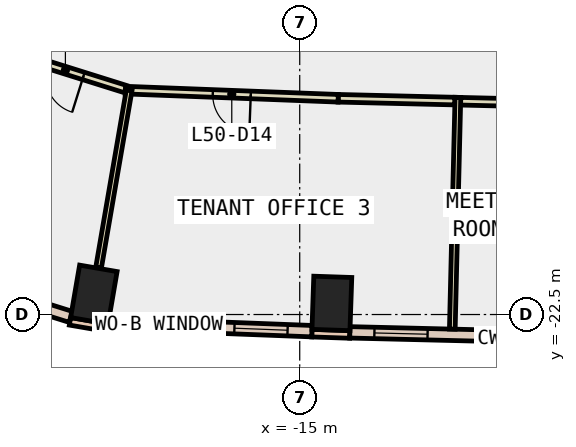
"""IFC4 building model, lengths in metres.
Left out: names, types, materials, properties, quantities, classifications, styles, units other than length and angle.
Written with IfcOpenShell. Run it as: python <this file> out.ifc"""

import sys

from ifc_helpers import new_model, si_unit, direction, frame, frame_2d, origin, origin_2d, place, context, subcontext, project, spatial, rectangle, extrude, element, fill, save


model = new_model("IFC4")
c1 = context("Model", 3, precision=1e-05, world=origin(), true_north=direction((0.0, 1.0)))
c2 = subcontext(c1, "Body", "Model", "MODEL_VIEW")
j1 = project(units=[si_unit("LENGTHUNIT", "METRE"), si_unit("PLANEANGLEUNIT", "RADIAN")], contexts=[c1])
p1 = place(None, origin())
s1 = spatial("IfcSite", under=j1, at=p1, CompositionType="ELEMENT")
p2 = place(p1, origin())
s2 = spatial("IfcBuilding", under=s1, at=p2, CompositionType="ELEMENT")
p3 = place(p2, frame((0.0, 0.0, 223.4)))
s3 = spatial("IfcBuildingStorey", under=s2, at=p3, CompositionType="ELEMENT", Elevation=223.4)
for number, where, z_axis, x_axis in (
    (1, (-20.417, -21.975, -0.4), (0.0, 0.0, 1.0), (-0.986, 0.169, 0.0)),
    (2, (-14.154, -22.208, -0.4), (0.0, 0.0, 1.0), (-0.999, 0.034, 0.0)),
):
    element("IfcColumn", number, at=place(p3, frame(where, z_axis=z_axis, x_axis=x_axis)), inside=s3, PredefinedType="COLUMN", context=c2, shape_type="SweptSolid", body=[
        extrude(rectangle(XDim=1.0, YDim=1.4, at=origin_2d()), origin(), (0.0, 0.0, 1.0), 4.2),
    ])
p4 = place(p3, frame((-21.045, -22.679, 0.0), z_axis=(0.0, 0.0, 1.0), x_axis=(0.985631544579, -0.168909615862, 0.0)))
e3 = element("IfcWall", 3, at=p4, inside=s3, PredefinedType="STANDARD", context=c2, shape_type="SweptSolid", body=[
    extrude(rectangle(XDim=1.0, YDim=0.2, at=frame_2d((0.5, 0.0))), origin(), (0.0, 0.0, 1.0), 3.8),
])
p5 = place(p3, frame((-14.681, -22.99, 0.0), z_axis=(0.0, 0.0, 1.0), x_axis=(0.999423561854, -0.033949138587, 0.0)))
e4 = element("IfcWall", 4, at=p5, inside=s3, PredefinedType="STANDARD", context=c2, shape_type="SweptSolid", body=[
    extrude(rectangle(XDim=1.0, YDim=0.2, at=frame_2d((0.5, 0.0))), origin(), (0.0, 0.0, 1.0), 3.8),
])
p6 = place(p3, frame((-20.04, -22.732, 0.0), z_axis=(0.0, 0.0, 1.0), x_axis=(0.99926218254, -0.038406907512, 0.0)))
e5 = element("IfcWall", 5, at=p6, inside=s3, PredefinedType="STANDARD", context=c2, shape_type="SweptSolid", body=[
    extrude(rectangle(XDim=5.365, YDim=0.3, at=frame_2d((2.683, 0.0))), origin(), (0.0, 0.0, 1.0), 3.8),
])
p7 = place(p6, frame((0.641, 0.0, 0.9)))
e6 = element("IfcOpeningElement", 6, at=p7, cuts=e5, PredefinedType="OPENING", context=c2, shape_type="SweptSolid", body=[
    extrude(rectangle(XDim=1.4, YDim=2.6, at=frame_2d((0.7, 1.3))), frame((0.0, 0.16, 0.0), z_axis=(0.0, -1.0, 0.0), x_axis=(1.0, 0.0, 0.0)), (0.0, 0.0, 1.0), 0.32),
])
p8 = place(p6, frame((3.324, 0.0, 0.9)))
e7 = element("IfcOpeningElement", 7, at=p8, cuts=e5, PredefinedType="OPENING", context=c2, shape_type="SweptSolid", body=[
    extrude(rectangle(XDim=1.4, YDim=2.6, at=frame_2d((0.7, 1.3))), frame((0.0, 0.16, 0.0), z_axis=(0.0, -1.0, 0.0), x_axis=(1.0, 0.0, 0.0)), (0.0, 0.0, 1.0), 0.32),
])
p9 = place(p3, frame((-13.681, -22.969, 0.0), z_axis=(0.0, 0.0, 1.0), x_axis=(0.999708030006, -0.024163086341, 0.0)))
e8 = element("IfcWall", 8, at=p9, inside=s3, PredefinedType="STANDARD", context=c2, shape_type="SweptSolid", body=[
    extrude(rectangle(XDim=5.385, YDim=0.3, at=frame_2d((2.693, 0.0))), origin(), (0.0, 0.0, 1.0), 3.8),
])
p10 = place(p9, frame((0.646, 0.0, 0.9)))
e9 = element("IfcOpeningElement", 9, at=p10, cuts=e8, PredefinedType="OPENING", context=c2, shape_type="SweptSolid", body=[
    extrude(rectangle(XDim=1.4, YDim=2.6, at=frame_2d((0.7, 1.3))), frame((0.0, 0.16, 0.0), z_axis=(0.0, -1.0, 0.0), x_axis=(1.0, 0.0, 0.0)), (0.0, 0.0, 1.0), 0.32),
])
p11 = place(p9, frame((3.339, 0.0, 0.9)))
e10 = element("IfcOpeningElement", 10, at=p11, cuts=e8, PredefinedType="OPENING", context=c2, shape_type="SweptSolid", body=[
    extrude(rectangle(XDim=1.4, YDim=2.6, at=frame_2d((0.7, 1.3))), frame((0.0, 0.16, 0.0), z_axis=(0.0, -1.0, 0.0), x_axis=(1.0, 0.0, 0.0)), (0.0, 0.0, 1.0), 0.32),
])
p12 = place(p3, frame((-25.367, -21.202, 0.0), z_axis=(0.0, 0.0, 1.0), x_axis=(0.954297481837, -0.298858354675, 0.0)))
e11 = element("IfcWall", 11, at=p12, inside=s3, PredefinedType="STANDARD", context=c2, shape_type="SweptSolid", body=[
    extrude(rectangle(XDim=4.551, YDim=0.3, at=frame_2d((2.275, 0.0))), origin(), (0.0, 0.0, 1.0), 3.8),
])
p13 = place(p12, frame((1.575, 0.0, 0.9)))
e12 = element("IfcOpeningElement", 12, at=p13, cuts=e11, PredefinedType="OPENING", context=c2, shape_type="SweptSolid", body=[
    extrude(rectangle(XDim=1.4, YDim=2.6, at=frame_2d((0.7, 1.3))), frame((0.0, 0.16, 0.0), z_axis=(0.0, -1.0, 0.0), x_axis=(1.0, 0.0, 0.0)), (0.0, 0.0, 1.0), 0.32),
])
p14 = place(p3, frame((-19.583, -16.569, 0.0), z_axis=(0.0, 0.0, 1.0), x_axis=(-0.954238750745, 0.299045826884, 0.0)))
e13 = element("IfcWall", 13, at=p14, inside=s3, PredefinedType="PARTITIONING", context=c2, shape_type="SweptSolid", body=[
    extrude(rectangle(XDim=3.318, YDim=0.2, at=frame_2d((1.659, 0.0))), origin(), (0.0, 0.0, 1.0), 3.8),
])
p15 = place(p14, frame((1.159, 0.0, 0.0)))
e14 = element("IfcOpeningElement", 14, at=p15, cuts=e13, PredefinedType="OPENING", context=c2, shape_type="SweptSolid", body=[
    extrude(rectangle(XDim=1.0, YDim=2.1, at=frame_2d((0.5, 1.05))), frame((0.0, 0.11, 0.0), z_axis=(0.0, -1.0, 0.0), x_axis=(1.0, 0.0, 0.0)), (0.0, 0.0, 1.0), 0.22),
])
p16 = place(p3, frame((-10.915, -16.884, 0.0), z_axis=(0.0, 0.0, 1.0), x_axis=(-0.999710384303, 0.024065483947, 0.0)))
e15 = element("IfcWall", 15, at=p16, inside=s3, PredefinedType="PARTITIONING", context=c2, shape_type="SweptSolid", body=[
    extrude(rectangle(XDim=3.074, YDim=0.2, at=frame_2d((1.537, 0.0))), origin(), (0.0, 0.0, 1.0), 3.8),
])
p17 = place(p3, frame((-13.988, -16.81, 0.0), z_axis=(0.0, 0.0, 1.0), x_axis=(-0.999263168163, 0.038381255227, 0.0)))
e16 = element("IfcWall", 16, at=p17, inside=s3, PredefinedType="PARTITIONING", context=c2, shape_type="SweptSolid", body=[
    extrude(rectangle(XDim=5.604, YDim=0.2, at=frame_2d((2.802, 0.0))), origin(), (0.0, 0.0, 1.0), 3.8),
])
p18 = place(p17, frame((2.302, 0.0, 0.0)))
e17 = element("IfcOpeningElement", 17, at=p18, cuts=e16, PredefinedType="OPENING", context=c2, shape_type="SweptSolid", body=[
    extrude(rectangle(XDim=1.0, YDim=2.1, at=frame_2d((0.5, 1.05))), frame((0.0, 0.11, 0.0), z_axis=(0.0, -1.0, 0.0), x_axis=(1.0, 0.0, 0.0)), (0.0, 0.0, 1.0), 0.22),
])
p19 = place(p3, frame((-7.9, -16.957, 0.0), z_axis=(0.0, 0.0, 1.0), x_axis=(-0.999709338637, 0.024108883071, 0.0)))
e18 = element("IfcWall", 18, at=p19, inside=s3, PredefinedType="PARTITIONING", context=c2, shape_type="SweptSolid", body=[
    extrude(rectangle(XDim=2.866, YDim=0.2, at=frame_2d((1.433, 0.0))), origin(), (0.0, 0.0, 1.0), 3.8),
])
p20 = place(p3, frame((-19.488, -16.599, 0.0), z_axis=(0.0, 0.0, 1.0), x_axis=(-0.169963884325, -0.985450292011, 0.0)))
e19 = element("IfcWall", 19, at=p20, inside=s3, PredefinedType="PARTITIONING", context=c2, shape_type="SweptSolid", body=[
    extrude(rectangle(XDim=4.736, YDim=0.15, at=frame_2d((2.368, 0.0))), origin(), (0.0, 0.0, 1.0), 3.8),
])
p21 = place(p3, frame((-10.838, -16.786, 0.0), z_axis=(0.0, 0.0, 1.0), x_axis=(-0.024134212614, -0.999708727471, 0.0)))
e20 = element("IfcWall", 20, at=p21, inside=s3, PredefinedType="PARTITIONING", context=c2, shape_type="SweptSolid", body=[
    extrude(rectangle(XDim=6.1, YDim=0.15, at=frame_2d((3.05, 0.0))), origin(), (0.0, 0.0, 1.0), 3.8),
])
p22 = place(p7, origin())
e21 = element("IfcWindow", 21, at=p22, inside=s3, PartitioningType="SINGLE_PANEL", PredefinedType="WINDOW", context=c2, shape_type="SweptSolid", body=[
    extrude(rectangle(XDim=1.4, YDim=2.6, at=frame_2d((0.7, 1.3))), frame((0.0, 0.03, 0.0), z_axis=(0.0, -1.0, 0.0), x_axis=(1.0, 0.0, 0.0)), (0.0, 0.0, 1.0), 0.06),
])
fill(e6, e21)
p23 = place(p8, origin())
e22 = element("IfcWindow", 22, at=p23, inside=s3, PartitioningType="SINGLE_PANEL", PredefinedType="WINDOW", context=c2, shape_type="SweptSolid", body=[
    extrude(rectangle(XDim=1.4, YDim=2.6, at=frame_2d((0.7, 1.3))), frame((0.0, 0.03, 0.0), z_axis=(0.0, -1.0, 0.0), x_axis=(1.0, 0.0, 0.0)), (0.0, 0.0, 1.0), 0.06),
])
fill(e7, e22)
p24 = place(p10, origin())
e23 = element("IfcWindow", 23, at=p24, inside=s3, PartitioningType="SINGLE_PANEL", PredefinedType="WINDOW", context=c2, shape_type="SweptSolid", body=[
    extrude(rectangle(XDim=1.4, YDim=2.6, at=frame_2d((0.7, 1.3))), frame((0.0, 0.03, 0.0), z_axis=(0.0, -1.0, 0.0), x_axis=(1.0, 0.0, 0.0)), (0.0, 0.0, 1.0), 0.06),
])
fill(e9, e23)
p25 = place(p11, origin())
e24 = element("IfcWindow", 24, at=p25, inside=s3, PartitioningType="SINGLE_PANEL", PredefinedType="WINDOW", context=c2, shape_type="SweptSolid", body=[
    extrude(rectangle(XDim=1.4, YDim=2.6, at=frame_2d((0.7, 1.3))), frame((0.0, 0.03, 0.0), z_axis=(0.0, -1.0, 0.0), x_axis=(1.0, 0.0, 0.0)), (0.0, 0.0, 1.0), 0.06),
])
fill(e10, e24)
p26 = place(p15, origin())
e25 = element("IfcDoor", 25, at=p26, inside=s3, OperationType="SINGLE_SWING_RIGHT", PredefinedType="DOOR", context=c2, shape_type="SweptSolid", body=[
    extrude(rectangle(XDim=1.0, YDim=2.1, at=frame_2d((0.5, 1.05))), frame((0.0, 0.025, 0.0), z_axis=(0.0, -1.0, 0.0), x_axis=(1.0, 0.0, 0.0)), (0.0, 0.0, 1.0), 0.05),
])
fill(e14, e25)
p27 = place(p18, origin())
e26 = element("IfcDoor", 26, at=p27, inside=s3, OperationType="SINGLE_SWING_LEFT", PredefinedType="DOOR", context=c2, shape_type="SweptSolid", body=[
    extrude(rectangle(XDim=1.0, YDim=2.1, at=frame_2d((0.5, 1.05))), frame((0.0, 0.025, 0.0), z_axis=(0.0, -1.0, 0.0), x_axis=(1.0, 0.0, 0.0)), (0.0, 0.0, 1.0), 0.05),
])
fill(e17, e26)
save(model, sys.argv[1])
